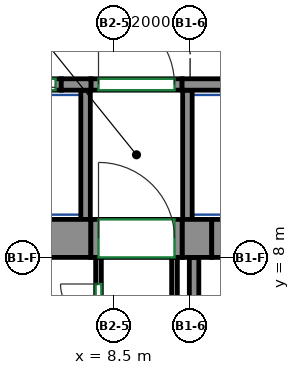
"""IFC4 building model, lengths in metres.
Left out: names, types, materials, properties, quantities, classifications, styles, units other than length and angle.
Written with IfcOpenShell. Run it as: python <this file> out.ifc"""

import sys

from ifc_helpers import new_model, si_unit, direction, frame, frame_2d, origin, place, context, subcontext, project, spatial, rectangle, extrude, source, transform, mapped, element, fill, save


model = new_model("IFC4")
c1 = context("Model", 3, precision=1e-05, world=origin(), true_north=direction((0.0, 1.0)))
c2 = subcontext(c1, "Body", "Model", "MODEL_VIEW")
j1 = project(units=[si_unit("LENGTHUNIT", "METRE"), si_unit("PLANEANGLEUNIT", "RADIAN")], contexts=[c1])
p1 = place(None, origin())
s1 = spatial("IfcSite", under=j1, at=p1, CompositionType="ELEMENT")
p2 = place(p1, origin())
s2 = spatial("IfcBuilding", under=s1, at=p2, CompositionType="ELEMENT")
p3 = place(p2, frame((0.0, 0.0, 39.0)))
s3 = spatial("IfcBuildingStorey", under=s2, at=p3, CompositionType="ELEMENT", Elevation=39.0)
m1 = source(origin(), c2, "Body", "SweptSolid", [
    extrude(rectangle(XDim=14.18, YDim=1.0, at=frame_2d((7.09, 0.0))), origin(), (0.0, 0.0, 1.0), 3.72),
])
p4 = place(p3, frame((-6.29, 8.5, 0.0), z_axis=(0.0, 0.0, 1.0), x_axis=(1.0, 0.0, 0.0)))
e1 = element("IfcWall", 1, at=p4, inside=s3, PredefinedType="SHEAR", context=c2, shape_type="MappedRepresentation", body=[
    mapped(m1, transform((0.0, 0.0, 0.0))),
])
m2 = source(origin(), c2, "Body", "SweptSolid", [
    extrude(rectangle(XDim=0.78, YDim=1.0, at=frame_2d((0.39, 0.0))), origin(), (0.0, 0.0, 1.0), 3.72),
])
p5 = place(p3, frame((10.29, 8.5, 0.0), z_axis=(0.0, 0.0, 1.0), x_axis=(1.0, 0.0, 0.0)))
e2 = element("IfcWall", 2, at=p5, inside=s3, PredefinedType="SHEAR", context=c2, shape_type="MappedRepresentation", body=[
    mapped(m2, transform((0.0, 0.0, 0.0))),
])
m3 = source(origin(), c2, "Body", "SweptSolid", [
    extrude(rectangle(XDim=0.78, YDim=0.3, at=frame_2d((0.39, 0.0))), origin(), (0.0, 0.0, 1.0), 3.72),
])
p6 = place(p3, frame((7.11, 12.55, 0.0), z_axis=(0.0, 0.0, 1.0), x_axis=(1.0, 0.0, 0.0)))
e3 = element("IfcWall", 3, at=p6, inside=s3, PredefinedType="SHEAR", context=c2, shape_type="MappedRepresentation", body=[
    mapped(m3, transform((0.0, 0.0, 0.0))),
])
m4 = source(origin(), c2, "Body", "SweptSolid", [
    extrude(rectangle(XDim=2.82, YDim=0.3, at=frame_2d((1.41, 0.0))), origin(), (0.0, 0.0, 1.0), 3.72),
])
p7 = place(p3, frame((10.29, 12.55, 0.0), z_axis=(0.0, 0.0, 1.0), x_axis=(1.0, 0.0, 0.0)))
e4 = element("IfcWall", 4, at=p7, inside=s3, PredefinedType="SHEAR", context=c2, shape_type="MappedRepresentation", body=[
    mapped(m4, transform((0.0, 0.0, 0.0))),
])
m5 = source(origin(), c2, "Body", "SweptSolid", [
    extrude(rectangle(XDim=1.4, YDim=0.3, at=frame_2d((0.7, 0.0))), origin(), (0.0, 0.0, 1.0), 3.72),
])
p8 = place(p3, frame((5.71, 12.55, 0.0), z_axis=(0.0, 0.0, 1.0), x_axis=(1.0, 0.0, 0.0)))
e5 = element("IfcWall", 5, at=p8, inside=s3, PredefinedType="PARTITIONING", context=c2, shape_type="MappedRepresentation", body=[
    mapped(m5, transform((0.0, 0.0, 0.0))),
])
p9 = place(p8, frame((0.15, 0.0, 0.0)))
e6 = element("IfcOpeningElement", 6, at=p9, cuts=e5, PredefinedType="OPENING", context=c2, shape_type="SweptSolid", body=[
    extrude(rectangle(XDim=1.1, YDim=2.1, at=frame_2d((0.55, 1.05))), frame((0.0, 0.16, 0.0), z_axis=(0.0, -1.0, 0.0), x_axis=(1.0, 0.0, 0.0)), (0.0, 0.0, 1.0), 0.32),
])
m6 = source(origin(), c2, "Body", "SweptSolid", [
    extrude(rectangle(XDim=2.4, YDim=0.3, at=frame_2d((1.2, 0.0))), origin(), (0.0, 0.0, 1.0), 3.72),
])
p10 = place(p3, frame((7.89, 12.55, 0.0), z_axis=(0.0, 0.0, 1.0), x_axis=(1.0, 0.0, 0.0)))
e7 = element("IfcWall", 7, at=p10, inside=s3, PredefinedType="PARTITIONING", context=c2, shape_type="MappedRepresentation", body=[
    mapped(m6, transform((0.0, 0.0, 0.0))),
])
p11 = place(p10, frame((0.2, 0.0, 0.0)))
e8 = element("IfcOpeningElement", 8, at=p11, cuts=e7, PredefinedType="OPENING", context=c2, shape_type="SweptSolid", body=[
    extrude(rectangle(XDim=2.0, YDim=2.1, at=frame_2d((1.0, 1.05))), frame((0.0, 0.16, 0.0), z_axis=(0.0, -1.0, 0.0), x_axis=(1.0, 0.0, 0.0)), (0.0, 0.0, 1.0), 0.32),
])
m7 = source(origin(), c2, "Body", "SweptSolid", [
    extrude(rectangle(XDim=2.65, YDim=0.25, at=frame_2d((1.325, 0.0))), origin(), (0.0, 0.0, 1.0), 3.72),
])
p12 = place(p3, frame((10.605, 5.35, 0.0), z_axis=(0.0, 0.0, 1.0), x_axis=(0.0, 1.0, 0.0)))
e9 = element("IfcWall", 9, at=p12, inside=s3, PredefinedType="PARTITIONING", context=c2, shape_type="MappedRepresentation", body=[
    mapped(m7, transform((0.0, 0.0, 0.0))),
])
m8 = source(origin(), c2, "Body", "SweptSolid", [
    extrude(rectangle(XDim=3.4, YDim=0.25, at=frame_2d((1.7, 0.0))), origin(), (0.0, 0.0, 1.0), 3.72),
])
for number, where, z_axis, x_axis in (
    (10, (10.43, 9.0, 0.0), (0.0, 0.0, 1.0), (0.0, 1.0, 0.0)),
    (11, (7.75, 9.0, 0.0), (0.0, 0.0, 1.0), (0.0, 1.0, 0.0)),
):
    element("IfcWall", number, at=place(p3, frame(where, z_axis=z_axis, x_axis=x_axis)), inside=s3, PredefinedType="PARTITIONING", context=c2, shape_type="MappedRepresentation", body=[
        mapped(m8, transform((0.0, 0.0, 0.0))),
    ])
m9 = source(origin(), c2, "Body", "SweptSolid", [
    extrude(rectangle(XDim=2.4, YDim=1.0, at=frame_2d((1.2, 0.0))), origin(), (0.0, 0.0, 1.0), 2.7),
])
p13 = place(p3, frame((7.89, 8.5, 0.0), z_axis=(0.0, 0.0, 1.0), x_axis=(1.0, 0.0, 0.0)))
e12 = element("IfcWall", 12, at=p13, inside=s3, PredefinedType="PARTITIONING", context=c2, shape_type="MappedRepresentation", body=[
    mapped(m9, transform((0.0, 0.0, 0.0))),
])
p14 = place(p13, frame((0.2, 0.0, 0.0)))
e13 = element("IfcOpeningElement", 13, at=p14, cuts=e12, PredefinedType="OPENING", context=c2, shape_type="SweptSolid", body=[
    extrude(rectangle(XDim=2.0, YDim=2.1, at=frame_2d((1.0, 1.05))), frame((0.0, 0.51, 0.0), z_axis=(0.0, -1.0, 0.0), x_axis=(1.0, 0.0, 0.0)), (0.0, 0.0, 1.0), 1.02),
])
m10 = source(origin(), c2, "Body", "SweptSolid", [
    extrude(rectangle(XDim=1.4, YDim=1.0, at=frame_2d((0.7, 0.0))), origin(), (0.0, 0.0, 1.0), 2.7),
])
p15 = place(p3, frame((11.07, 8.5, 0.0), z_axis=(0.0, 0.0, 1.0), x_axis=(1.0, 0.0, 0.0)))
e14 = element("IfcWall", 14, at=p15, inside=s3, PredefinedType="PARTITIONING", context=c2, shape_type="MappedRepresentation", body=[
    mapped(m10, transform((0.0, 0.0, 0.0))),
])
p16 = place(p15, frame((0.25, 0.0, 0.0)))
e15 = element("IfcOpeningElement", 15, at=p16, cuts=e14, PredefinedType="OPENING", context=c2, shape_type="SweptSolid", body=[
    extrude(rectangle(XDim=0.9, YDim=2.1, at=frame_2d((0.45, 1.05))), frame((0.0, 0.51, 0.0), z_axis=(0.0, -1.0, 0.0), x_axis=(1.0, 0.0, 0.0)), (0.0, 0.0, 1.0), 1.02),
])
p17 = place(p3, frame((10.09, -0.35, 0.0), z_axis=(0.0, 0.0, 1.0), x_axis=(0.0, 1.0, 0.0)))
e16 = element("IfcWall", 16, at=p17, inside=s3, PredefinedType="PARTITIONING", context=c2, shape_type="SweptSolid", body=[
    extrude(rectangle(XDim=8.35, YDim=0.15, at=frame_2d((4.175, 0.0))), origin(), (0.0, 0.0, 1.0), 3.72),
])
p18 = place(p17, frame((4.329, 0.0, 0.0)))
e17 = element("IfcOpeningElement", 17, at=p18, cuts=e16, PredefinedType="OPENING", context=c2, shape_type="SweptSolid", body=[
    extrude(rectangle(XDim=0.9, YDim=2.1, at=frame_2d((0.45, 1.05))), frame((0.0, 0.085, 0.0), z_axis=(0.0, -1.0, 0.0), x_axis=(1.0, 0.0, 0.0)), (0.0, 0.0, 1.0), 0.17),
])
p19 = place(p3, frame((8.09, 5.75, 0.0), z_axis=(0.0, 0.0, 1.0), x_axis=(0.0, 1.0, 0.0)))
e18 = element("IfcWall", 18, at=p19, inside=s3, PredefinedType="PARTITIONING", context=c2, shape_type="SweptSolid", body=[
    extrude(rectangle(XDim=2.25, YDim=0.15, at=frame_2d((1.125, 0.0))), origin(), (0.0, 0.0, 1.0), 3.72),
])
p20 = place(p19, frame((0.55, 0.0, 0.0)))
e19 = element("IfcOpeningElement", 19, at=p20, cuts=e18, PredefinedType="OPENING", context=c2, shape_type="SweptSolid", body=[
    extrude(rectangle(XDim=1.0, YDim=2.1, at=frame_2d((0.5, 1.05))), frame((0.0, 0.085, 0.0), z_axis=(0.0, -1.0, 0.0), x_axis=(1.0, 0.0, 0.0)), (0.0, 0.0, 1.0), 0.17),
])
p21 = place(p11, origin())
e20 = element("IfcDoor", 20, at=p21, inside=s3, OperationType="DOUBLE_DOOR_SINGLE_SWING", PredefinedType="DOOR", context=c2, shape_type="SweptSolid", body=[
    extrude(rectangle(XDim=2.0, YDim=2.1, at=frame_2d((1.0, 1.05))), frame((0.0, 0.025, 0.0), z_axis=(0.0, -1.0, 0.0), x_axis=(1.0, 0.0, 0.0)), (0.0, 0.0, 1.0), 0.05),
])
fill(e8, e20)
p22 = place(p14, origin())
e21 = element("IfcDoor", 21, at=p22, inside=s3, OperationType="DOUBLE_DOOR_SINGLE_SWING", PredefinedType="DOOR", context=c2, shape_type="SweptSolid", body=[
    extrude(rectangle(XDim=2.0, YDim=2.1, at=frame_2d((1.0, 1.05))), frame((0.0, 0.405, 0.0), z_axis=(0.0, -1.0, 0.0), x_axis=(1.0, 0.0, 0.0)), (0.0, 0.0, 1.0), 0.05),
])
fill(e13, e21)
p23 = place(p9, origin())
e22 = element("IfcDoor", 22, at=p23, inside=s3, OperationType="DOUBLE_DOOR_SLIDING", PredefinedType="DOOR", context=c2, shape_type="SweptSolid", body=[
    extrude(rectangle(XDim=1.1, YDim=2.1, at=frame_2d((0.55, 1.05))), frame((0.0, 0.025, 0.0), z_axis=(0.0, -1.0, 0.0), x_axis=(1.0, 0.0, 0.0)), (0.0, 0.0, 1.0), 0.05),
])
fill(e6, e22)
p24 = place(p20, origin())
e23 = element("IfcDoor", 23, at=p24, inside=s3, OperationType="SINGLE_SWING_RIGHT", PredefinedType="DOOR", context=c2, shape_type="SweptSolid", body=[
    extrude(rectangle(XDim=1.0, YDim=2.1, at=frame_2d((0.5, 1.05))), frame((0.0, 0.025, 0.0), z_axis=(0.0, -1.0, 0.0), x_axis=(1.0, 0.0, 0.0)), (0.0, 0.0, 1.0), 0.05),
])
fill(e19, e23)
save(model, sys.argv[1])
